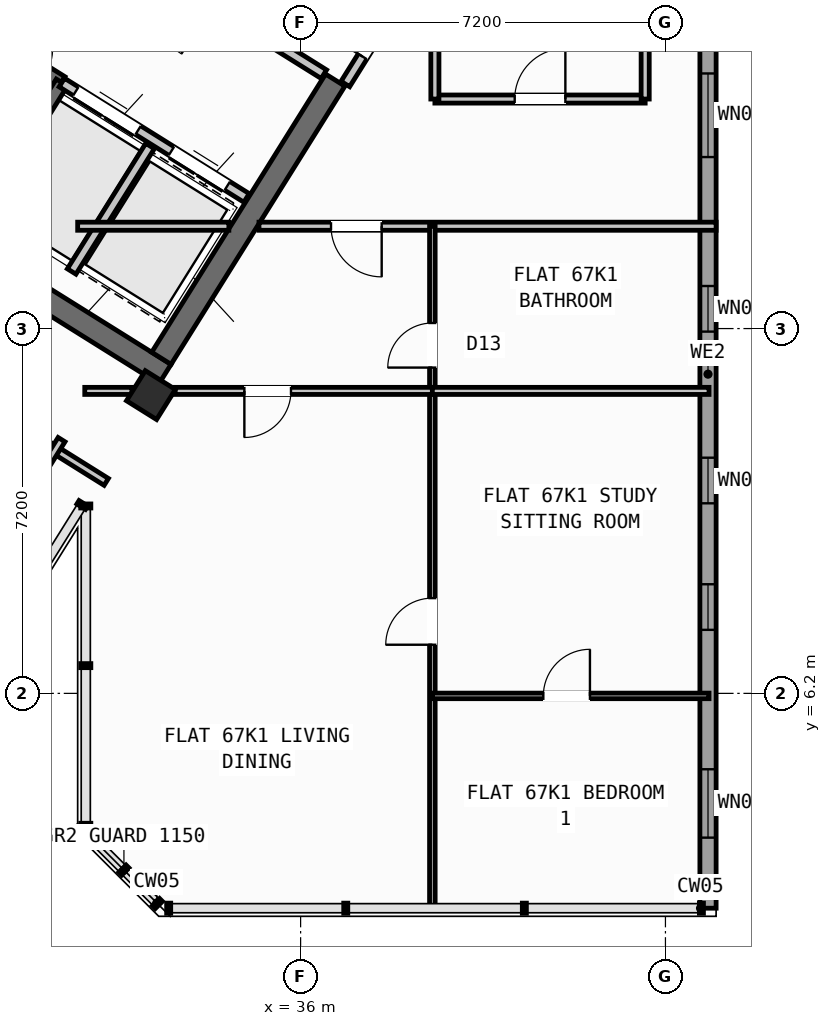
"""IFC4 building model, lengths in metres.
Left out: names, types, materials, properties, quantities, classifications, styles, units other than length and angle.
Written with IfcOpenShell. Run it as: python <this file> out.ifc"""

import sys

from ifc_helpers import new_model, si_unit, direction, frame, frame_2d, origin, origin_2d, place, context, subcontext, project, spatial, rectangle, hollow_rectangle, extrude, source, transform, mapped, element, fill, save


model = new_model("IFC4")
c1 = context("Model", 3, precision=1e-05, world=origin(), true_north=direction((0.0, 1.0)))
c2 = subcontext(c1, "Body", "Model", "MODEL_VIEW")
j1 = project(units=[si_unit("LENGTHUNIT", "METRE"), si_unit("PLANEANGLEUNIT", "RADIAN")], contexts=[c1])
p1 = place(None, origin())
s1 = spatial("IfcSite", under=j1, at=p1, CompositionType="ELEMENT")
p2 = place(p1, origin())
s2 = spatial("IfcBuilding", under=s1, at=p2, CompositionType="ELEMENT")
p3 = place(p2, frame((0.0, 0.0, 266.4)))
s3 = spatial("IfcBuildingStorey", under=s2, at=p3, CompositionType="ELEMENT", Elevation=266.4)
p4 = place(p3, frame((33.324, 12.503, 0.0), z_axis=(0.0, 0.0, 1.0), x_axis=(-0.848043529849, 0.529926571782, 0.0)))
e1 = element("IfcWall", 1, at=p4, inside=s3, PredefinedType="SHEAR", context=c2, shape_type="SweptSolid", body=[
    extrude(rectangle(XDim=13.04, YDim=0.45, at=frame_2d((6.52, 0.0))), origin(), (0.0, 0.0, 1.0), 3.35),
])
p5 = place(p3, frame((36.683, 18.304, 0.0), z_axis=(0.0, 0.0, 1.0), x_axis=(-0.529904039071, -0.848057609704, 0.0)))
e2 = element("IfcWall", 2, at=p5, inside=s3, PredefinedType="SHEAR", context=c2, shape_type="SweptSolid", body=[
    extrude(rectangle(XDim=6.475, YDim=0.45, at=frame_2d((3.238, 0.0))), origin(), (0.0, 0.0, 1.0), 3.35),
])
m1 = source(origin(), c2, "Body", "SweptSolid", [
    extrude(hollow_rectangle(XDim=0.7, YDim=0.7, WallThickness=0.028, at=origin_2d()), origin(), (0.0, 0.0, 1.0), 3.6),
])
p6 = place(p3, frame((33.046, 12.087, 0.0), z_axis=(0.0, 0.0, 1.0), x_axis=(-0.848048096156, 0.529919264233, 0.0)))
e3 = element("IfcColumn", 3, at=p6, inside=s3, PredefinedType="COLUMN", context=c2, shape_type="MappedRepresentation", body=[
    mapped(m1, transform((0.0, 0.0, 0.0), scale=1.0)),
])
p7 = place(p3, frame((44.04, 23.04, 0.0), z_axis=(0.0, 0.0, 1.0), x_axis=(0.0, -1.0, 0.0)))
e4 = element("IfcWall", 4, at=p7, inside=s3, PredefinedType="STANDARD", context=c2, shape_type="SweptSolid", body=[
    extrude(rectangle(XDim=21.08, YDim=0.32, at=frame_2d((10.54, 0.0))), origin(), (0.0, 0.0, 1.0), 3.35),
])
p8 = place(p7, frame((1.285, 0.0, 0.9)))
e5 = element("IfcOpeningElement", 5, at=p8, cuts=e4, PredefinedType="OPENING", context=c2, shape_type="SweptSolid", body=[
    extrude(rectangle(XDim=1.65, YDim=1.45, at=frame_2d((0.825, 0.725))), frame((0.0, 0.17, 0.0), z_axis=(0.0, -1.0, 0.0), x_axis=(1.0, 0.0, 0.0)), (0.0, 0.0, 1.0), 0.34),
])
p9 = place(p7, frame((4.605, 0.0, 0.9)))
e6 = element("IfcOpeningElement", 6, at=p9, cuts=e4, PredefinedType="OPENING", context=c2, shape_type="SweptSolid", body=[
    extrude(rectangle(XDim=1.65, YDim=1.45, at=frame_2d((0.825, 0.725))), frame((0.0, 0.17, 0.0), z_axis=(0.0, -1.0, 0.0), x_axis=(1.0, 0.0, 0.0)), (0.0, 0.0, 1.0), 0.34),
])
p10 = place(p7, frame((8.8, 0.0, 1.0)))
e7 = element("IfcOpeningElement", 7, at=p10, cuts=e4, PredefinedType="OPENING", context=c2, shape_type="SweptSolid", body=[
    extrude(rectangle(XDim=0.9, YDim=1.25, at=frame_2d((0.45, 0.625))), frame((0.0, 0.17, 0.0), z_axis=(0.0, -1.0, 0.0), x_axis=(1.0, 0.0, 0.0)), (0.0, 0.0, 1.0), 0.34),
])
p11 = place(p7, frame((12.189, 0.0, 1.0)))
e8 = element("IfcOpeningElement", 8, at=p11, cuts=e4, PredefinedType="OPENING", context=c2, shape_type="SweptSolid", body=[
    extrude(rectangle(XDim=0.9, YDim=1.25, at=frame_2d((0.45, 0.625))), frame((0.0, 0.17, 0.0), z_axis=(0.0, -1.0, 0.0), x_axis=(1.0, 0.0, 0.0)), (0.0, 0.0, 1.0), 0.34),
])
p12 = place(p7, frame((14.686, 0.0, 1.0)))
e9 = element("IfcOpeningElement", 9, at=p12, cuts=e4, PredefinedType="OPENING", context=c2, shape_type="SweptSolid", body=[
    extrude(rectangle(XDim=0.9, YDim=1.25, at=frame_2d((0.45, 0.625))), frame((0.0, 0.17, 0.0), z_axis=(0.0, -1.0, 0.0), x_axis=(1.0, 0.0, 0.0)), (0.0, 0.0, 1.0), 0.34),
])
p13 = place(p7, frame((18.337, 0.0, 0.9)))
e10 = element("IfcOpeningElement", 10, at=p13, cuts=e4, PredefinedType="OPENING", context=c2, shape_type="SweptSolid", body=[
    extrude(rectangle(XDim=1.35, YDim=1.45, at=frame_2d((0.675, 0.725))), frame((0.0, 0.17, 0.0), z_axis=(0.0, -1.0, 0.0), x_axis=(1.0, 0.0, 0.0)), (0.0, 0.0, 1.0), 0.34),
])
p14 = place(p3, frame((31.28, 18.261, 0.0), z_axis=(0.0, 0.0, 1.0), x_axis=(-0.848051618787, 0.529913626805, 0.0)))
e11 = element("IfcWall", 11, at=p14, inside=s3, PredefinedType="SHEAR", context=c2, shape_type="SweptSolid", body=[
    extrude(rectangle(XDim=7.46, YDim=0.26, at=frame_2d((3.73, 0.0))), origin(), (0.0, 0.0, 1.0), 3.35),
])
p15 = place(p14, frame((0.36, 0.0, 0.0)))
e12 = element("IfcOpeningElement", 12, at=p15, cuts=e11, PredefinedType="OPENING", context=c2, shape_type="SweptSolid", body=[
    extrude(rectangle(XDim=0.86, YDim=2.05, at=frame_2d((0.43, 1.025))), frame((0.0, 0.14, 0.0), z_axis=(0.0, -1.0, 0.0), x_axis=(1.0, 0.0, 0.0)), (0.0, 0.0, 1.0), 0.28),
])
p16 = place(p3, frame((31.288, 18.256, 0.0), z_axis=(0.0, 0.0, 1.0), x_axis=(-0.529943379326, -0.848033026897, 0.0)))
e13 = element("IfcWall", 13, at=p16, inside=s3, PredefinedType="SHEAR", context=c2, shape_type="SweptSolid", body=[
    extrude(rectangle(XDim=3.16, YDim=0.26, at=frame_2d((1.58, 0.0))), origin(), (0.0, 0.0, 1.0), 3.35),
])
p17 = place(p3, frame((34.933, 15.978, 0.0), z_axis=(0.0, 0.0, 1.0), x_axis=(-0.848055739377, 0.529907032327, 0.0)))
e14 = element("IfcWall", 14, at=p17, inside=s3, PredefinedType="STANDARD", context=c2, shape_type="SweptSolid", body=[
    extrude(rectangle(XDim=4.298, YDim=0.2, at=frame_2d((2.149, 0.0))), origin(), (0.0, 0.0, 1.0), 3.34),
])
p18 = place(p17, frame((0.448, 0.0, 0.0)))
e15 = element("IfcOpeningElement", 15, at=p18, cuts=e14, PredefinedType="OPENING", context=c2, shape_type="SweptSolid", body=[
    extrude(rectangle(XDim=1.3, YDim=2.2, at=frame_2d((0.65, 1.1))), frame((0.0, 0.11, 0.0), z_axis=(0.0, -1.0, 0.0), x_axis=(1.0, 0.0, 0.0)), (0.0, 0.0, 1.0), 0.22),
])
p19 = place(p17, frame((2.523, 0.0, 0.0)))
e16 = element("IfcOpeningElement", 16, at=p19, cuts=e14, PredefinedType="OPENING", context=c2, shape_type="SweptSolid", body=[
    extrude(rectangle(XDim=1.45, YDim=2.25, at=frame_2d((0.725, 1.125))), frame((0.0, 0.11, 0.0), z_axis=(0.0, -1.0, 0.0), x_axis=(1.0, 0.0, 0.0)), (0.0, 0.0, 1.0), 0.22),
])
p20 = place(p3, frame((36.459, 18.421, 0.0), z_axis=(0.0, 0.0, 1.0), x_axis=(-0.848059591691, 0.529900867089, 0.0)))
e17 = element("IfcWall", 17, at=p20, inside=s3, PredefinedType="STANDARD", context=c2, shape_type="SweptSolid", body=[
    extrude(rectangle(XDim=5.818, YDim=0.2, at=frame_2d((2.909, 0.0))), origin(), (0.0, 0.0, 1.0), 3.34),
])
p21 = place(p20, frame((2.598, 0.0, 0.0)))
e18 = element("IfcOpeningElement", 18, at=p21, cuts=e17, PredefinedType="OPENING", context=c2, shape_type="SweptSolid", body=[
    extrude(rectangle(XDim=1.15, YDim=2.1, at=frame_2d((0.575, 1.05))), frame((0.0, 0.11, 0.0), z_axis=(0.0, -1.0, 0.0), x_axis=(1.0, 0.0, 0.0)), (0.0, 0.0, 1.0), 0.22),
])
p22 = place(p3, frame((33.029, 17.003, 0.0), z_axis=(0.0, 0.0, 1.0), x_axis=(-0.529916267533, -0.848049968695, 0.0)))
e19 = element("IfcWall", 19, at=p22, inside=s3, PredefinedType="STANDARD", context=c2, shape_type="SweptSolid", body=[
    extrude(rectangle(XDim=2.92, YDim=0.2, at=frame_2d((1.46, 0.0))), origin(), (0.0, 0.0, 1.0), 3.34),
])
p23 = place(p3, frame((32.164, 10.374, 0.0), z_axis=(0.0, 0.0, 1.0), x_axis=(-0.848044107957, 0.529925646633, 0.0)))
e20 = element("IfcWall", 20, at=p23, inside=s3, PredefinedType="PARTITIONING", context=c2, shape_type="SweptSolid", body=[
    extrude(rectangle(XDim=15.57, YDim=0.16, at=frame_2d((7.785, 0.0))), origin(), (0.0, 0.0, 1.0), 3.34),
])
p24 = place(p23, frame((10.83, 0.0, 0.0)))
e21 = element("IfcOpeningElement", 21, at=p24, cuts=e20, PredefinedType="OPENING", context=c2, shape_type="SweptSolid", body=[
    extrude(rectangle(XDim=1.0, YDim=2.1, at=frame_2d((0.5, 1.05))), frame((0.0, 0.09, 0.0), z_axis=(0.0, -1.0, 0.0), x_axis=(1.0, 0.0, 0.0)), (0.0, 0.0, 1.0), 0.18),
])
p25 = place(p3, frame((31.282, 11.208, 0.0), z_axis=(0.0, 0.0, 1.0), x_axis=(-0.529938869374, -0.84803584519, 0.0)))
e22 = element("IfcWall", 22, at=p25, inside=s3, PredefinedType="PARTITIONING", context=c2, shape_type="SweptSolid", body=[
    extrude(rectangle(XDim=5.48, YDim=0.16, at=frame_2d((2.74, 0.0))), origin(), (0.0, 0.0, 1.0), 3.34),
])
p26 = place(p3, frame((38.451, 20.737, 0.0), z_axis=(0.0, 0.0, 1.0), x_axis=(-0.529924799939, -0.848044637038, 0.0)))
e23 = element("IfcWall", 23, at=p26, inside=s3, PredefinedType="STANDARD", context=c2, shape_type="SweptSolid", body=[
    extrude(rectangle(XDim=2.96, YDim=0.2, at=frame_2d((1.48, 0.0))), origin(), (0.0, 0.0, 1.0), 3.34),
])
p27 = place(p26, frame((1.46, 0.0, 0.0)))
e24 = element("IfcOpeningElement", 24, at=p27, cuts=e23, PredefinedType="OPENING", context=c2, shape_type="SweptSolid", body=[
    extrude(rectangle(XDim=0.86, YDim=2.05, at=frame_2d((0.43, 1.025))), frame((0.0, 0.11, 0.0), z_axis=(0.0, -1.0, 0.0), x_axis=(1.0, 0.0, 0.0)), (0.0, 0.0, 1.0), 0.22),
])
p28 = place(p3, frame((31.6, 15.42, 0.0), z_axis=(0.0, 0.0, 1.0), x_axis=(1.0, 0.0, 0.0)))
e25 = element("IfcWall", 25, at=p28, inside=s3, PredefinedType="PARTITIONING", context=c2, shape_type="SweptSolid", body=[
    extrude(rectangle(XDim=2.984, YDim=0.16, at=frame_2d((1.492, 0.0))), origin(), (0.0, 0.0, 1.0), 3.34),
])
p29 = place(p3, frame((35.178, 15.42, 0.0), z_axis=(0.0, 0.0, 1.0), x_axis=(1.0, 0.0, 0.0)))
e26 = element("IfcWall", 26, at=p29, inside=s3, PredefinedType="PARTITIONING", context=c2, shape_type="SweptSolid", body=[
    extrude(rectangle(XDim=9.021, YDim=0.16, at=frame_2d((4.511, 0.0))), origin(), (0.0, 0.0, 1.0), 3.34),
])
p30 = place(p29, frame((1.422, 0.0, 0.0)))
e27 = element("IfcOpeningElement", 27, at=p30, cuts=e26, PredefinedType="OPENING", context=c2, shape_type="SweptSolid", body=[
    extrude(rectangle(XDim=1.0, YDim=2.1, at=frame_2d((0.5, 1.05))), frame((0.0, 0.09, 0.0), z_axis=(0.0, -1.0, 0.0), x_axis=(1.0, 0.0, 0.0)), (0.0, 0.0, 1.0), 0.18),
])
p31 = place(p3, frame((38.65, 17.93, 0.0), z_axis=(0.0, 0.0, 1.0), x_axis=(1.0, 0.0, 0.0)))
e28 = element("IfcWall", 28, at=p31, inside=s3, PredefinedType="PARTITIONING", context=c2, shape_type="SweptSolid", body=[
    extrude(rectangle(XDim=4.15, YDim=0.16, at=frame_2d((2.075, 0.0))), origin(), (0.0, 0.0, 1.0), 3.34),
])
p32 = place(p31, frame((1.575, 0.0, 0.0)))
e29 = element("IfcOpeningElement", 29, at=p32, cuts=e28, PredefinedType="OPENING", context=c2, shape_type="SweptSolid", body=[
    extrude(rectangle(XDim=1.0, YDim=2.1, at=frame_2d((0.5, 1.05))), frame((0.0, 0.09, 0.0), z_axis=(0.0, -1.0, 0.0), x_axis=(1.0, 0.0, 0.0)), (0.0, 0.0, 1.0), 0.18),
])
p33 = place(p3, frame((38.65, 17.93, 0.0), z_axis=(0.0, 0.0, 1.0), x_axis=(0.0, 1.0, 0.0)))
e30 = element("IfcWall", 30, at=p33, inside=s3, PredefinedType="PARTITIONING", context=c2, shape_type="SweptSolid", body=[
    extrude(rectangle(XDim=3.046, YDim=0.16, at=frame_2d((1.523, 0.0))), origin(), (0.0, 0.0, 1.0), 3.34),
])
p34 = place(p3, frame((42.8, 17.93, 0.0), z_axis=(0.0, 0.0, 1.0), x_axis=(0.0, 1.0, 0.0)))
e31 = element("IfcWall", 31, at=p34, inside=s3, PredefinedType="PARTITIONING", context=c2, shape_type="SweptSolid", body=[
    extrude(rectangle(XDim=3.57, YDim=0.16, at=frame_2d((1.785, 0.0))), origin(), (0.0, 0.0, 1.0), 3.34),
])
p35 = place(p3, frame((38.6, 1.96, 0.0), z_axis=(0.0, 0.0, 1.0), x_axis=(0.0, 1.0, 0.0)))
e32 = element("IfcWall", 32, at=p35, inside=s3, PredefinedType="PARTITIONING", context=c2, shape_type="SweptSolid", body=[
    extrude(rectangle(XDim=13.46, YDim=0.11, at=frame_2d((6.73, 0.0))), origin(), (0.0, 0.0, 1.0), 3.34),
])
p36 = place(p35, frame((5.2, 0.0, 0.0)))
e33 = element("IfcOpeningElement", 33, at=p36, cuts=e32, PredefinedType="OPENING", context=c2, shape_type="SweptSolid", body=[
    extrude(rectangle(XDim=0.92, YDim=2.08, at=frame_2d((0.46, 1.04))), frame((0.0, 0.065, 0.0), z_axis=(0.0, -1.0, 0.0), x_axis=(1.0, 0.0, 0.0)), (0.0, 0.0, 1.0), 0.13),
])
p37 = place(p35, frame((10.67, 0.0, 0.0)))
e34 = element("IfcOpeningElement", 34, at=p37, cuts=e32, PredefinedType="OPENING", context=c2, shape_type="SweptSolid", body=[
    extrude(rectangle(XDim=0.88, YDim=2.08, at=frame_2d((0.44, 1.04))), frame((0.0, 0.065, 0.0), z_axis=(0.0, -1.0, 0.0), x_axis=(1.0, 0.0, 0.0)), (0.0, 0.0, 1.0), 0.13),
])
p38 = place(p3, frame((31.74, 12.17, 0.0), z_axis=(0.0, 0.0, 1.0), x_axis=(1.0, 0.0, 0.0)))
e35 = element("IfcWall", 35, at=p38, inside=s3, PredefinedType="PLUMBINGWALL", context=c2, shape_type="SweptSolid", body=[
    extrude(rectangle(XDim=0.931, YDim=0.14, at=frame_2d((0.466, 0.0))), origin(), (0.0, 0.0, 1.0), 3.34),
])
p39 = place(p3, frame((33.525, 12.17, 0.0), z_axis=(0.0, 0.0, 1.0), x_axis=(1.0, 0.0, 0.0)))
e36 = element("IfcWall", 36, at=p39, inside=s3, PredefinedType="PLUMBINGWALL", context=c2, shape_type="SweptSolid", body=[
    extrude(rectangle(XDim=5.075, YDim=0.14, at=frame_2d((2.538, 0.0))), origin(), (0.0, 0.0, 1.0), 3.34),
])
p40 = place(p39, frame((1.365, 0.0, 0.0)))
e37 = element("IfcOpeningElement", 37, at=p40, cuts=e36, PredefinedType="OPENING", context=c2, shape_type="SweptSolid", body=[
    extrude(rectangle(XDim=0.92, YDim=2.08, at=frame_2d((0.46, 1.04))), frame((0.0, 0.08, 0.0), z_axis=(0.0, -1.0, 0.0), x_axis=(1.0, 0.0, 0.0)), (0.0, 0.0, 1.0), 0.16),
])
p41 = place(p3, frame((38.6, 12.17, 0.0), z_axis=(0.0, 0.0, 1.0), x_axis=(1.0, 0.0, 0.0)))
e38 = element("IfcWall", 38, at=p41, inside=s3, PredefinedType="PLUMBINGWALL", context=c2, shape_type="SweptSolid", body=[
    extrude(rectangle(XDim=5.46, YDim=0.14, at=frame_2d((2.73, 0.0))), origin(), (0.0, 0.0, 1.0), 3.34),
])
p42 = place(p3, frame((38.6, 6.15, 0.0), z_axis=(0.0, 0.0, 1.0), x_axis=(1.0, 0.0, 0.0)))
e39 = element("IfcWall", 39, at=p42, inside=s3, PredefinedType="PARTITIONING", context=c2, shape_type="SweptSolid", body=[
    extrude(rectangle(XDim=5.46, YDim=0.11, at=frame_2d((2.73, 0.0))), origin(), (0.0, 0.0, 1.0), 3.34),
])
p43 = place(p42, frame((2.19, 0.0, 0.0)))
e40 = element("IfcOpeningElement", 40, at=p43, cuts=e39, PredefinedType="OPENING", context=c2, shape_type="SweptSolid", body=[
    extrude(rectangle(XDim=0.92, YDim=2.08, at=frame_2d((0.46, 1.04))), frame((0.0, 0.065, 0.0), z_axis=(0.0, -1.0, 0.0), x_axis=(1.0, 0.0, 0.0)), (0.0, 0.0, 1.0), 0.13),
])
m2 = source(origin(), c2, "Body", "SweptSolid", [
    extrude(rectangle(XDim=1.65, YDim=1.45, at=frame_2d((0.825, 0.725))), frame((0.0, 0.03, 0.0), z_axis=(0.0, -1.0, 0.0), x_axis=(1.0, 0.0, 0.0)), (0.0, 0.0, 1.0), 0.06),
])
p44 = place(p9, origin())
e41 = element("IfcWindow", 41, at=p44, inside=s3, PartitioningType="SINGLE_PANEL", PredefinedType="WINDOW", context=c2, shape_type="MappedRepresentation", body=[
    mapped(m2, transform((0.0, 0.0, 0.0), scale=1.0)),
])
fill(e6, e41)
m3 = source(origin(), c2, "Body", "SweptSolid", [
    extrude(rectangle(XDim=0.9, YDim=1.25, at=frame_2d((0.45, 0.625))), frame((0.0, 0.03, 0.0), z_axis=(0.0, -1.0, 0.0), x_axis=(1.0, 0.0, 0.0)), (0.0, 0.0, 1.0), 0.06),
])
p45 = place(p10, origin())
e42 = element("IfcWindow", 42, at=p45, inside=s3, PartitioningType="SINGLE_PANEL", PredefinedType="WINDOW", context=c2, shape_type="MappedRepresentation", body=[
    mapped(m3, transform((0.0, 0.0, 0.0), scale=1.0)),
])
fill(e7, e42)
p46 = place(p11, origin())
e43 = element("IfcWindow", 43, at=p46, inside=s3, PartitioningType="SINGLE_PANEL", PredefinedType="WINDOW", context=c2, shape_type="MappedRepresentation", body=[
    mapped(m3, transform((0.0, 0.0, 0.0), scale=1.0)),
])
fill(e8, e43)
p47 = place(p12, origin())
e44 = element("IfcWindow", 44, at=p47, inside=s3, PartitioningType="SINGLE_PANEL", PredefinedType="WINDOW", context=c2, shape_type="MappedRepresentation", body=[
    mapped(m3, transform((0.0, 0.0, 0.0), scale=1.0)),
])
fill(e9, e44)
m4 = source(origin(), c2, "Body", "SweptSolid", [
    extrude(rectangle(XDim=1.35, YDim=1.45, at=frame_2d((0.675, 0.725))), frame((0.0, 0.03, 0.0), z_axis=(0.0, -1.0, 0.0), x_axis=(1.0, 0.0, 0.0)), (0.0, 0.0, 1.0), 0.06),
])
p48 = place(p13, origin())
e45 = element("IfcWindow", 45, at=p48, inside=s3, PartitioningType="SINGLE_PANEL", PredefinedType="WINDOW", context=c2, shape_type="MappedRepresentation", body=[
    mapped(m4, transform((0.0, 0.0, 0.0), scale=1.0)),
])
fill(e10, e45)
m5 = source(origin(), c2, "Body", "SweptSolid", [
    extrude(rectangle(XDim=1.3, YDim=2.2, at=frame_2d((0.65, 1.1))), frame((0.0, 0.025, 0.0), z_axis=(0.0, -1.0, 0.0), x_axis=(1.0, 0.0, 0.0)), (0.0, 0.0, 1.0), 0.05),
])
p49 = place(p18, origin())
e46 = element("IfcDoor", 46, at=p49, inside=s3, OperationType="DOUBLE_DOOR_SLIDING", PredefinedType="DOOR", context=c2, shape_type="MappedRepresentation", body=[
    mapped(m5, transform((0.0, 0.0, 0.0), scale=1.0)),
])
fill(e15, e46)
m6 = source(origin(), c2, "Body", "SweptSolid", [
    extrude(rectangle(XDim=1.45, YDim=2.25, at=frame_2d((0.725, 1.125))), frame((0.0, 0.025, 0.0), z_axis=(0.0, -1.0, 0.0), x_axis=(1.0, 0.0, 0.0)), (0.0, 0.0, 1.0), 0.05),
])
p50 = place(p19, origin())
e47 = element("IfcDoor", 47, at=p50, inside=s3, OperationType="DOUBLE_DOOR_SLIDING", PredefinedType="DOOR", context=c2, shape_type="MappedRepresentation", body=[
    mapped(m6, transform((0.0, 0.0, 0.0), scale=1.0)),
])
fill(e16, e47)
m7 = source(origin(), c2, "Body", "SweptSolid", [
    extrude(rectangle(XDim=1.0, YDim=2.1, at=frame_2d((0.5, 1.05))), frame((0.0, 0.025, 0.0), z_axis=(0.0, -1.0, 0.0), x_axis=(1.0, 0.0, 0.0)), (0.0, 0.0, 1.0), 0.05),
])
p51 = place(p32, origin())
e48 = element("IfcDoor", 48, at=p51, inside=s3, OperationType="SINGLE_SWING_RIGHT", PredefinedType="DOOR", context=c2, shape_type="MappedRepresentation", body=[
    mapped(m7, transform((0.0, 0.0, 0.0), scale=1.0)),
])
fill(e29, e48)
m8 = source(origin(), c2, "Body", "SweptSolid", [
    extrude(rectangle(XDim=0.86, YDim=2.05, at=frame_2d((0.43, 1.025))), frame((0.0, 0.025, 0.0), z_axis=(0.0, -1.0, 0.0), x_axis=(1.0, 0.0, 0.0)), (0.0, 0.0, 1.0), 0.05),
])
p52 = place(p27, frame((0.86, 0.0, 0.0), z_axis=(0.0, 0.0, 1.0), x_axis=(-1.0, 0.0, 0.0)))
e49 = element("IfcDoor", 49, at=p52, inside=s3, OperationType="SINGLE_SWING_LEFT", PredefinedType="DOOR", context=c2, shape_type="MappedRepresentation", body=[
    mapped(m8, transform((0.0, 0.0, 0.0), scale=1.0)),
])
fill(e24, e49)
m9 = source(origin(), c2, "Body", "SweptSolid", [
    extrude(rectangle(XDim=0.92, YDim=2.08, at=frame_2d((0.46, 1.04))), frame((0.0, 0.025, 0.0), z_axis=(0.0, -1.0, 0.0), x_axis=(1.0, 0.0, 0.0)), (0.0, 0.0, 1.0), 0.05),
])
p53 = place(p36, origin())
e50 = element("IfcDoor", 50, at=p53, inside=s3, OperationType="SINGLE_SWING_LEFT", PredefinedType="DOOR", context=c2, shape_type="MappedRepresentation", body=[
    mapped(m9, transform((0.0, 0.0, 0.0), scale=1.0)),
])
fill(e33, e50)
p54 = place(p43, origin())
e51 = element("IfcDoor", 51, at=p54, inside=s3, OperationType="SINGLE_SWING_RIGHT", PredefinedType="DOOR", context=c2, shape_type="MappedRepresentation", body=[
    mapped(m9, transform((0.0, 0.0, 0.0), scale=1.0)),
])
fill(e40, e51)
p55 = place(p30, frame((1.0, 0.0, 0.0), z_axis=(0.0, 0.0, 1.0), x_axis=(-1.0, 0.0, 0.0)))
e52 = element("IfcDoor", 52, at=p55, inside=s3, OperationType="SINGLE_SWING_LEFT", PredefinedType="DOOR", context=c2, shape_type="MappedRepresentation", body=[
    mapped(m7, transform((0.0, 0.0, 0.0), scale=1.0)),
])
fill(e27, e52)
p56 = place(p40, frame((0.92, 0.0, 0.0), z_axis=(0.0, 0.0, 1.0), x_axis=(-1.0, 0.0, 0.0)))
e53 = element("IfcDoor", 53, at=p56, inside=s3, OperationType="SINGLE_SWING_RIGHT", PredefinedType="DOOR", context=c2, shape_type="MappedRepresentation", body=[
    mapped(m9, transform((0.0, 0.0, 0.0), scale=1.0)),
])
fill(e37, e53)
m10 = source(origin(), c2, "Body", "SweptSolid", [
    extrude(rectangle(XDim=0.88, YDim=2.08, at=frame_2d((0.44, 1.04))), frame((0.0, 0.025, 0.0), z_axis=(0.0, -1.0, 0.0), x_axis=(1.0, 0.0, 0.0)), (0.0, 0.0, 1.0), 0.05),
])
p57 = place(p37, origin())
e54 = element("IfcDoor", 54, at=p57, inside=s3, OperationType="SINGLE_SWING_LEFT", PredefinedType="DOOR", context=c2, shape_type="MappedRepresentation", body=[
    mapped(m10, transform((0.0, 0.0, 0.0), scale=1.0)),
])
fill(e34, e54)
save(model, sys.argv[1])
